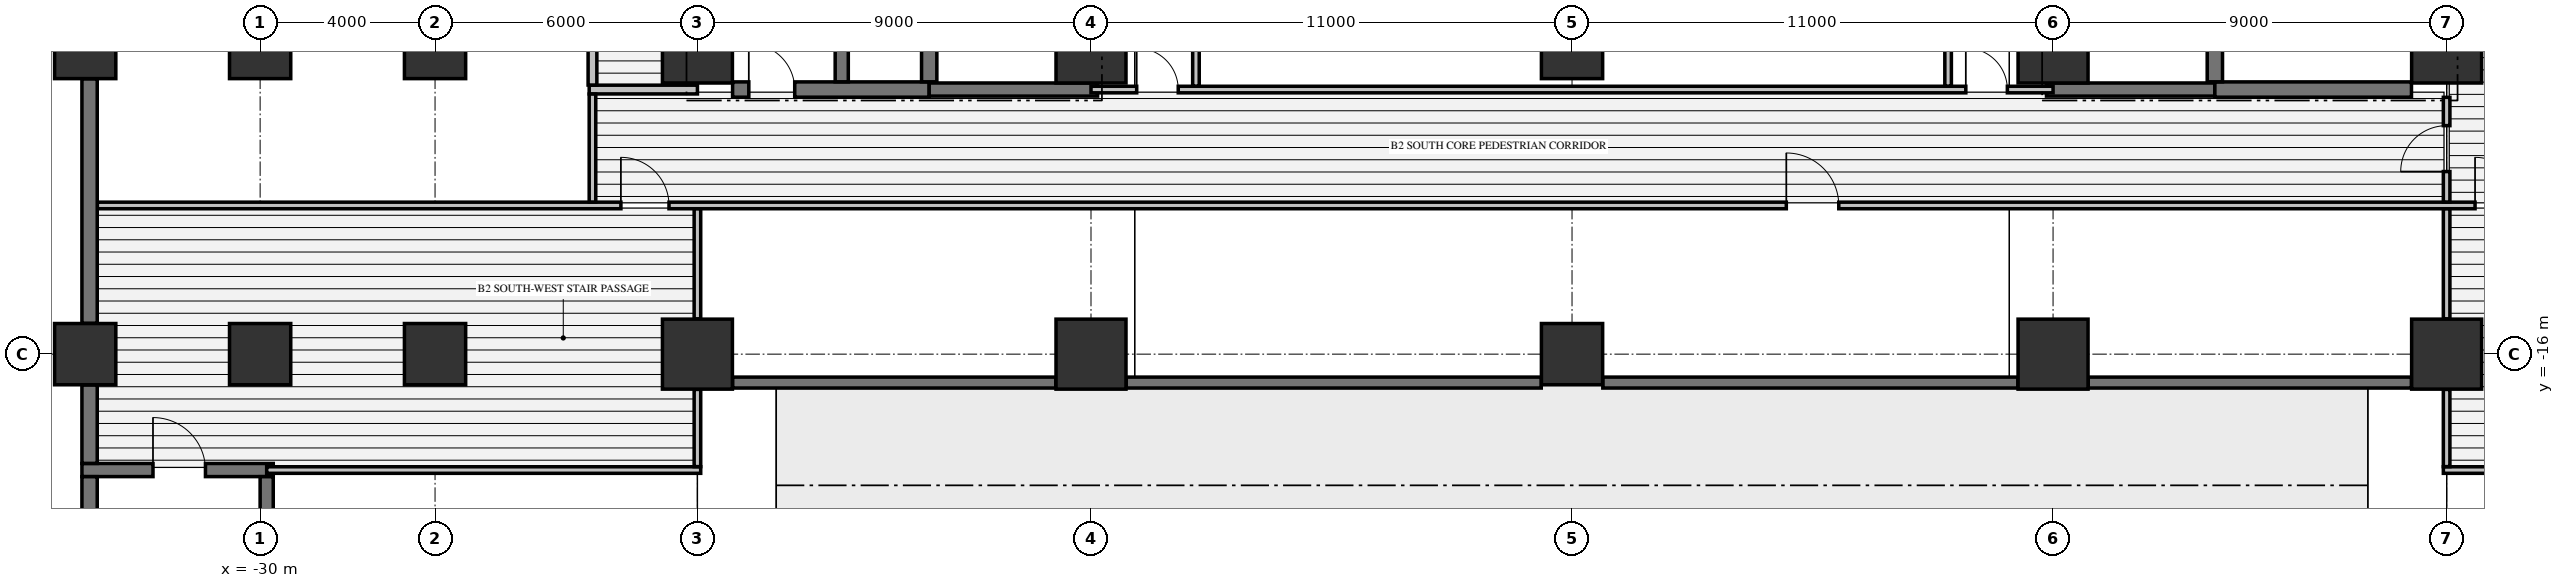
"""IFC4 building model, lengths in metres.
Left out: names, types, materials, properties, quantities, classifications, styles, units other than length and angle.
Written with IfcOpenShell. Run it as: python <this file> out.ifc"""

import sys

from ifc_helpers import new_model, si_unit, direction, frame, frame_2d, origin, origin_2d, place, context, subcontext, project, spatial, rectangle, extrude, element, fill, save


model = new_model("IFC4")
c1 = context("Model", 3, precision=1e-05, world=origin(), true_north=direction((0.0, 1.0)))
c2 = subcontext(c1, "Body", "Model", "MODEL_VIEW")
j1 = project(units=[si_unit("LENGTHUNIT", "METRE"), si_unit("PLANEANGLEUNIT", "RADIAN")], contexts=[c1])
p1 = place(None, origin())
s1 = spatial("IfcSite", under=j1, at=p1, CompositionType="ELEMENT")
p2 = place(p1, origin())
s2 = spatial("IfcBuilding", under=s1, at=p2, CompositionType="ELEMENT")
p3 = place(p2, frame((0.0, 0.0, -9.1)))
s3 = spatial("IfcBuildingStorey", under=s2, at=p3, CompositionType="ELEMENT", Elevation=-9.1)
for number, where, z_axis, x_axis in (
    (1, (-34.0, -16.0, -0.45), (0.0, 0.0, 1.0), (1.0, 0.0, 0.0)),
    (2, (-34.0, -9.0, -0.45), (0.0, 0.0, 1.0), (1.0, 0.0, 0.0)),
    (3, (-30.0, -16.0, -0.45), (0.0, 0.0, 1.0), (1.0, 0.0, 0.0)),
    (4, (-30.0, -9.0, -0.45), (0.0, 0.0, 1.0), (1.0, 0.0, 0.0)),
    (5, (-26.0, -16.0, -0.45), (0.0, 0.0, 1.0), (1.0, 0.0, 0.0)),
    (6, (-26.0, -9.0, -0.45), (0.0, 0.0, 1.0), (1.0, 0.0, 0.0)),
):
    element("IfcColumn", number, at=place(p3, frame(where, z_axis=z_axis, x_axis=x_axis)), inside=s3, PredefinedType="COLUMN", context=c2, shape_type="SweptSolid", body=[
        extrude(rectangle(XDim=1.4, YDim=1.4, at=origin_2d()), origin(), (0.0, 0.0, 1.0), 4.65),
    ])
for number, where, z_axis, x_axis in (
    (7, (-20.0, -16.0, -0.45), (0.0, 0.0, 1.0), (1.0, 0.0, 0.0)),
    (8, (-20.0, -9.0, -0.45), (0.0, 0.0, 1.0), (1.0, 0.0, 0.0)),
    (9, (-11.0, -16.0, -0.45), (0.0, 0.0, 1.0), (1.0, 0.0, 0.0)),
    (10, (-11.0, -9.0, -0.45), (0.0, 0.0, 1.0), (1.0, 0.0, 0.0)),
):
    element("IfcColumn", number, at=place(p3, frame(where, z_axis=z_axis, x_axis=x_axis)), inside=s3, PredefinedType="COLUMN", context=c2, shape_type="SweptSolid", body=[
        extrude(rectangle(XDim=1.6, YDim=1.6, at=origin_2d()), origin(), (0.0, 0.0, 1.0), 4.65),
    ])
for number, where, z_axis, x_axis in (
    (11, (0.0, -16.0, -0.45), (0.0, 0.0, 1.0), (1.0, 0.0, 0.0)),
    (12, (0.0, -9.0, -0.45), (0.0, 0.0, 1.0), (1.0, 0.0, 0.0)),
):
    element("IfcColumn", number, at=place(p3, frame(where, z_axis=z_axis, x_axis=x_axis)), inside=s3, PredefinedType="COLUMN", context=c2, shape_type="SweptSolid", body=[
        extrude(rectangle(XDim=1.4, YDim=1.4, at=origin_2d()), origin(), (0.0, 0.0, 1.0), 4.65),
    ])
for number, where, z_axis, x_axis in (
    (13, (11.0, -16.0, -0.45), (0.0, 0.0, 1.0), (1.0, 0.0, 0.0)),
    (14, (11.0, -9.0, -0.45), (0.0, 0.0, 1.0), (1.0, 0.0, 0.0)),
    (15, (20.0, -16.0, -0.45), (0.0, 0.0, 1.0), (1.0, 0.0, 0.0)),
    (16, (20.0, -9.0, -0.45), (0.0, 0.0, 1.0), (1.0, 0.0, 0.0)),
):
    element("IfcColumn", number, at=place(p3, frame(where, z_axis=z_axis, x_axis=x_axis)), inside=s3, PredefinedType="COLUMN", context=c2, shape_type="SweptSolid", body=[
        extrude(rectangle(XDim=1.6, YDim=1.6, at=origin_2d()), origin(), (0.0, 0.0, 1.0), 4.65),
    ])
p4 = place(p3, frame((-34.075, -18.65, 0.0), z_axis=(0.0, 0.0, 1.0), x_axis=(1.0, 0.0, 0.0)))
e17 = element("IfcWall", 17, at=p4, inside=s3, PredefinedType="SHEAR", context=c2, shape_type="SweptSolid", body=[
    extrude(rectangle(XDim=4.375, YDim=0.3, at=frame_2d((2.188, 0.0))), origin(), (0.0, 0.0, 1.0), 4.2),
])
p5 = place(p4, frame((1.625, 0.0, 0.0)))
e18 = element("IfcOpeningElement", 18, at=p5, cuts=e17, PredefinedType="OPENING", context=c2, shape_type="SweptSolid", body=[
    extrude(rectangle(XDim=1.2, YDim=2.15, at=frame_2d((0.6, 1.075))), frame((0.0, 0.16, 0.0), z_axis=(0.0, -1.0, 0.0), x_axis=(1.0, 0.0, 0.0)), (0.0, 0.0, 1.0), 0.32),
])
p6 = place(p3, frame((-19.196, -16.65, 0.0), z_axis=(0.0, 0.0, 1.0), x_axis=(1.0, 0.0, 0.0)))
e19 = element("IfcWall", 19, at=p6, inside=s3, PredefinedType="SOLIDWALL", context=c2, shape_type="SweptSolid", body=[
    extrude(rectangle(XDim=7.392, YDim=0.25, at=frame_2d((3.696, 0.0))), origin(), (0.0, 0.0, 1.0), 4.2),
])
for number, where, z_axis, x_axis in (
    (20, (-10.196, -16.65, 0.0), (0.0, 0.0, 1.0), (1.0, 0.0, 0.0)),
    (21, (0.704, -16.65, 0.0), (0.0, 0.0, 1.0), (1.0, 0.0, 0.0)),
):
    element("IfcWall", number, at=place(p3, frame(where, z_axis=z_axis, x_axis=x_axis)), inside=s3, PredefinedType="SOLIDWALL", context=c2, shape_type="SweptSolid", body=[
        extrude(rectangle(XDim=9.492, YDim=0.25, at=frame_2d((4.746, 0.0))), origin(), (0.0, 0.0, 1.0), 4.2),
    ])
p7 = place(p3, frame((11.804, -16.65, 0.0), z_axis=(0.0, 0.0, 1.0), x_axis=(1.0, 0.0, 0.0)))
e22 = element("IfcWall", 22, at=p7, inside=s3, PredefinedType="SOLIDWALL", context=c2, shape_type="SweptSolid", body=[
    extrude(rectangle(XDim=7.392, YDim=0.25, at=frame_2d((3.696, 0.0))), origin(), (0.0, 0.0, 1.0), 4.2),
])
p8 = place(p3, frame((-19.196, -9.95, 0.0), z_axis=(0.0, 0.0, 1.0), x_axis=(1.0, 0.0, 0.0)))
e23 = element("IfcWall", 23, at=p8, inside=s3, PredefinedType="SHEAR", context=c2, shape_type="SweptSolid", body=[
    extrude(rectangle(XDim=4.496, YDim=0.35, at=frame_2d((2.248, 0.0))), origin(), (0.0, 0.0, 1.0), 4.2),
])
p9 = place(p8, frame((0.371, 0.0, 0.0)))
e24 = element("IfcOpeningElement", 24, at=p9, cuts=e23, PredefinedType="OPENING", context=c2, shape_type="SweptSolid", body=[
    extrude(rectangle(XDim=1.05, YDim=2.15, at=frame_2d((0.525, 1.075))), frame((0.0, 0.185, 0.0), z_axis=(0.0, -1.0, 0.0), x_axis=(1.0, 0.0, 0.0)), (0.0, 0.0, 1.0), 0.37),
])
for number, where, z_axis, x_axis in (
    (25, (-14.7, -9.95, 0.0), (0.0, 0.0, 1.0), (1.0, 0.0, 0.0)),
    (26, (10.85, -9.95, 0.0), (0.0, 0.0, 1.0), (1.0, 0.0, 0.0)),
):
    element("IfcWall", number, at=place(p3, frame(where, z_axis=z_axis, x_axis=x_axis)), inside=s3, PredefinedType="SHEAR", context=c2, shape_type="SweptSolid", body=[
        extrude(rectangle(XDim=3.85, YDim=0.3, at=frame_2d((1.925, 0.0))), origin(), (0.0, 0.0, 1.0), 4.2),
    ])
p10 = place(p3, frame((14.7, -9.95, 0.0), z_axis=(0.0, 0.0, 1.0), x_axis=(1.0, 0.0, 0.0)))
e27 = element("IfcWall", 27, at=p10, inside=s3, PredefinedType="SHEAR", context=c2, shape_type="SweptSolid", body=[
    extrude(rectangle(XDim=4.496, YDim=0.35, at=frame_2d((2.248, 0.0))), origin(), (0.0, 0.0, 1.0), 4.2),
])
for number, where, z_axis, x_axis in (
    (28, (-29.85, -18.65, 0.0), (0.0, 0.0, 1.0), (1.0, 0.0, 0.0)),
    (29, (19.925, -18.65, 0.0), (0.0, 0.0, 1.0), (1.0, 0.0, 0.0)),
):
    element("IfcWall", number, at=place(p3, frame(where, z_axis=z_axis, x_axis=x_axis)), inside=s3, PredefinedType="PARTITIONING", context=c2, shape_type="SweptSolid", body=[
        extrude(rectangle(XDim=9.925, YDim=0.15, at=frame_2d((4.962, 0.0))), origin(), (0.0, 0.0, 1.0), 4.2),
    ])
p11 = place(p3, frame((-33.722, -12.6, 0.0), z_axis=(0.0, 0.0, 1.0), x_axis=(1.0, 0.0, 0.0)))
e30 = element("IfcWall", 30, at=p11, inside=s3, PredefinedType="PARTITIONING", context=c2, shape_type="SweptSolid", body=[
    extrude(rectangle(XDim=56.222, YDim=0.15, at=frame_2d((28.111, 0.0))), origin(), (0.0, 0.0, 1.0), 3.74),
])
p12 = place(p11, frame((11.972, 0.0, 0.0)))
e31 = element("IfcOpeningElement", 31, at=p12, cuts=e30, PredefinedType="OPENING", context=c2, shape_type="SweptSolid", body=[
    extrude(rectangle(XDim=1.1, YDim=2.15, at=frame_2d((0.55, 1.075))), frame((0.0, 0.085, 0.0), z_axis=(0.0, -1.0, 0.0), x_axis=(1.0, 0.0, 0.0)), (0.0, 0.0, 1.0), 0.17),
])
p13 = place(p11, frame((54.372, 0.0, 0.0)))
e32 = element("IfcOpeningElement", 32, at=p13, cuts=e30, PredefinedType="OPENING", context=c2, shape_type="SweptSolid", body=[
    extrude(rectangle(XDim=1.1, YDim=2.15, at=frame_2d((0.55, 1.075))), frame((0.0, 0.085, 0.0), z_axis=(0.0, -1.0, 0.0), x_axis=(1.0, 0.0, 0.0)), (0.0, 0.0, 1.0), 0.17),
])
p14 = place(p11, frame((38.622, 0.0, 0.0)))
e33 = element("IfcOpeningElement", 33, at=p14, cuts=e30, PredefinedType="OPENING", context=c2, shape_type="SweptSolid", body=[
    extrude(rectangle(XDim=1.2, YDim=2.15, at=frame_2d((0.6, 1.075))), frame((0.0, 0.085, 0.0), z_axis=(0.0, -1.0, 0.0), x_axis=(1.0, 0.0, 0.0)), (0.0, 0.0, 1.0), 0.17),
])
p15 = place(p3, frame((-22.475, -9.95, 0.0), z_axis=(0.0, 0.0, 1.0), x_axis=(1.0, 0.0, 0.0)))
e34 = element("IfcWall", 34, at=p15, inside=s3, PredefinedType="PARTITIONING", context=c2, shape_type="SweptSolid", body=[
    extrude(rectangle(XDim=2.475, YDim=0.2, at=frame_2d((1.238, 0.0))), origin(), (0.0, 0.0, 1.0), 4.2),
])
p16 = place(p3, frame((-11.0, -9.95, 0.0), z_axis=(0.0, 0.0, 1.0), x_axis=(1.0, 0.0, 0.0)))
e35 = element("IfcWall", 35, at=p16, inside=s3, PredefinedType="PARTITIONING", context=c2, shape_type="SweptSolid", body=[
    extrude(rectangle(XDim=22.0, YDim=0.15, at=frame_2d((11.0, 0.0))), origin(), (0.0, 0.0, 1.0), 4.2),
])
p17 = place(p16, frame((1.045, 0.0, 0.0)))
e36 = element("IfcOpeningElement", 36, at=p17, cuts=e35, PredefinedType="OPENING", context=c2, shape_type="SweptSolid", body=[
    extrude(rectangle(XDim=0.95, YDim=2.15, at=frame_2d((0.475, 1.075))), frame((0.0, 0.085, 0.0), z_axis=(0.0, -1.0, 0.0), x_axis=(1.0, 0.0, 0.0)), (0.0, 0.0, 1.0), 0.17),
])
p18 = place(p16, frame((20.005, 0.0, 0.0)))
e37 = element("IfcOpeningElement", 37, at=p18, cuts=e35, PredefinedType="OPENING", context=c2, shape_type="SweptSolid", body=[
    extrude(rectangle(XDim=0.95, YDim=2.15, at=frame_2d((0.475, 1.075))), frame((0.0, 0.085, 0.0), z_axis=(0.0, -1.0, 0.0), x_axis=(1.0, 0.0, 0.0)), (0.0, 0.0, 1.0), 0.17),
])
p19 = place(p3, frame((-33.9, -21.296, 0.0), z_axis=(0.0, 0.0, 1.0), x_axis=(0.0, 1.0, 0.0)))
e38 = element("IfcWall", 38, at=p19, inside=s3, PredefinedType="SHEAR", context=c2, shape_type="SweptSolid", body=[
    extrude(rectangle(XDim=2.494, YDim=0.35, at=frame_2d((1.247, 0.0))), origin(), (0.0, 0.0, 1.0), 4.2),
])
p20 = place(p3, frame((-33.9, -18.498, 0.0), z_axis=(0.0, 0.0, 1.0), x_axis=(0.0, 1.0, 0.0)))
e39 = element("IfcWall", 39, at=p20, inside=s3, PredefinedType="SHEAR", context=c2, shape_type="SweptSolid", body=[
    extrude(rectangle(XDim=1.794, YDim=0.35, at=frame_2d((0.897, 0.0))), origin(), (0.0, 0.0, 1.0), 4.2),
])
p21 = place(p3, frame((-33.9, -15.296, 0.0), z_axis=(0.0, 0.0, 1.0), x_axis=(0.0, 1.0, 0.0)))
e40 = element("IfcWall", 40, at=p21, inside=s3, PredefinedType="SHEAR", context=c2, shape_type="SweptSolid", body=[
    extrude(rectangle(XDim=5.592, YDim=0.35, at=frame_2d((2.796, 0.0))), origin(), (0.0, 0.0, 1.0), 4.2),
])
p22 = place(p3, frame((-29.85, -28.296, 0.0), z_axis=(0.0, 0.0, 1.0), x_axis=(0.0, 1.0, 0.0)))
e41 = element("IfcWall", 41, at=p22, inside=s3, PredefinedType="SHEAR", context=c2, shape_type="SweptSolid", body=[
    extrude(rectangle(XDim=9.494, YDim=0.3, at=frame_2d((4.747, 0.0))), origin(), (0.0, 0.0, 1.0), 4.2),
])
p23 = place(p3, frame((-16.7, -9.773, 0.0), z_axis=(0.0, 0.0, 1.0), x_axis=(0.0, 1.0, 0.0)))
e42 = element("IfcWall", 42, at=p23, inside=s3, PredefinedType="SHEAR", context=c2, shape_type="SweptSolid", body=[
    extrude(rectangle(XDim=9.371, YDim=0.3, at=frame_2d((4.686, 0.0))), origin(), (0.0, 0.0, 1.0), 4.2),
])
for number, where, z_axis, x_axis in (
    (43, (-14.7, -9.773, 0.0), (0.0, 0.0, 1.0), (0.0, 1.0, 0.0)),
    (44, (14.7, -9.773, 0.0), (0.0, 0.0, 1.0), (0.0, 1.0, 0.0)),
):
    element("IfcWall", number, at=place(p3, frame(where, z_axis=z_axis, x_axis=x_axis)), inside=s3, PredefinedType="SHEAR", context=c2, shape_type="SweptSolid", body=[
        extrude(rectangle(XDim=9.371, YDim=0.35, at=frame_2d((4.686, 0.0))), origin(), (0.0, 0.0, 1.0), 4.2),
    ])
p24 = place(p3, frame((-22.4, -12.522, 0.0), z_axis=(0.0, 0.0, 1.0), x_axis=(0.0, 1.0, 0.0)))
e45 = element("IfcWall", 45, at=p24, inside=s3, PredefinedType="PARTITIONING", context=c2, shape_type="SweptSolid", body=[
    extrude(rectangle(XDim=2.469, YDim=0.15, at=frame_2d((1.234, 0.0))), origin(), (0.0, 0.0, 1.0), 4.2),
])
p25 = place(p3, frame((-22.4, -9.847, 0.0), z_axis=(0.0, 0.0, 1.0), x_axis=(0.0, 1.0, 0.0)))
e46 = element("IfcWall", 46, at=p25, inside=s3, PredefinedType="PARTITIONING", context=c2, shape_type="SweptSolid", body=[
    extrude(rectangle(XDim=0.894, YDim=0.2, at=frame_2d((0.447, 0.0))), origin(), (0.0, 0.0, 1.0), 4.2),
])
p26 = place(p3, frame((-20.0, -18.572, 0.0), z_axis=(0.0, 0.0, 1.0), x_axis=(0.0, 1.0, 0.0)))
e47 = element("IfcWall", 47, at=p26, inside=s3, PredefinedType="PARTITIONING", context=c2, shape_type="SweptSolid", body=[
    extrude(rectangle(XDim=1.766, YDim=0.15, at=frame_2d((0.883, 0.0))), origin(), (0.0, 0.0, 1.0), 3.242),
])
p27 = place(p3, frame((-20.0, -15.194, 0.0), z_axis=(0.0, 0.0, 1.0), x_axis=(0.0, 1.0, 0.0)))
e48 = element("IfcWall", 48, at=p27, inside=s3, PredefinedType="PARTITIONING", context=c2, shape_type="SweptSolid", body=[
    extrude(rectangle(XDim=2.516, YDim=0.15, at=frame_2d((1.258, 0.0))), origin(), (0.0, 0.0, 1.0), 4.2),
])
for number, where, z_axis, x_axis in (
    (49, (-8.6, -9.872, 0.0), (0.0, 0.0, 1.0), (0.0, 1.0, 0.0)),
    (50, (8.6, -9.872, 0.0), (0.0, 0.0, 1.0), (0.0, 1.0, 0.0)),
):
    element("IfcWall", number, at=place(p3, frame(where, z_axis=z_axis, x_axis=x_axis)), inside=s3, PredefinedType="PARTITIONING", context=c2, shape_type="SweptSolid", body=[
        extrude(rectangle(XDim=9.266, YDim=0.15, at=frame_2d((4.633, 0.0))), origin(), (0.0, 0.0, 1.0), 4.2),
    ])
p28 = place(p3, frame((20.0, -18.572, 0.0), z_axis=(0.0, 0.0, 1.0), x_axis=(0.0, 1.0, 0.0)))
e51 = element("IfcWall", 51, at=p28, inside=s3, PredefinedType="PARTITIONING", context=c2, shape_type="SweptSolid", body=[
    extrude(rectangle(XDim=1.766, YDim=0.15, at=frame_2d((0.883, 0.0))), origin(), (0.0, 0.0, 1.0), 3.242),
])
p29 = place(p3, frame((20.0, -15.194, 0.0), z_axis=(0.0, 0.0, 1.0), x_axis=(0.0, 1.0, 0.0)))
e52 = element("IfcWall", 52, at=p29, inside=s3, PredefinedType="PARTITIONING", context=c2, shape_type="SweptSolid", body=[
    extrude(rectangle(XDim=2.516, YDim=0.15, at=frame_2d((1.258, 0.0))), origin(), (0.0, 0.0, 1.0), 3.242),
])
p30 = place(p3, frame((20.0, -12.522, 0.0), z_axis=(0.0, 0.0, 1.0), x_axis=(0.0, 1.0, 0.0)))
e53 = element("IfcWall", 53, at=p30, inside=s3, PredefinedType="PARTITIONING", context=c2, shape_type="SweptSolid", body=[
    extrude(rectangle(XDim=2.394, YDim=0.15, at=frame_2d((1.197, 0.0))), origin(), (0.0, 0.0, 1.0), 3.242),
])
p31 = place(p30, frame((0.697, 0.0, 0.0)))
e54 = element("IfcOpeningElement", 54, at=p31, cuts=e53, PredefinedType="OPENING", context=c2, shape_type="SweptSolid", body=[
    extrude(rectangle(XDim=1.05, YDim=2.15, at=frame_2d((0.525, 1.075))), frame((0.0, 0.085, 0.0), z_axis=(0.0, -1.0, 0.0), x_axis=(1.0, 0.0, 0.0)), (0.0, 0.0, 1.0), 0.17),
])
p32 = place(p9, origin())
e55 = element("IfcDoor", 55, at=p32, inside=s3, OperationType="SINGLE_SWING_LEFT", PredefinedType="DOOR", context=c2, shape_type="SweptSolid", body=[
    extrude(rectangle(XDim=1.05, YDim=2.15, at=frame_2d((0.525, 1.075))), frame((0.0, 0.025, 0.0), z_axis=(0.0, -1.0, 0.0), x_axis=(1.0, 0.0, 0.0)), (0.0, 0.0, 1.0), 0.05),
])
fill(e24, e55)
p33 = place(p5, origin())
e56 = element("IfcDoor", 56, at=p33, inside=s3, OperationType="SINGLE_SWING_LEFT", PredefinedType="DOOR", context=c2, shape_type="SweptSolid", body=[
    extrude(rectangle(XDim=1.2, YDim=2.15, at=frame_2d((0.6, 1.075))), frame((0.0, 0.025, 0.0), z_axis=(0.0, -1.0, 0.0), x_axis=(1.0, 0.0, 0.0)), (0.0, 0.0, 1.0), 0.05),
])
fill(e18, e56)
p34 = place(p17, origin())
e57 = element("IfcDoor", 57, at=p34, inside=s3, OperationType="SINGLE_SWING_LEFT", PredefinedType="DOOR", context=c2, shape_type="SweptSolid", body=[
    extrude(rectangle(XDim=0.95, YDim=2.15, at=frame_2d((0.475, 1.075))), frame((0.0, 0.025, 0.0), z_axis=(0.0, -1.0, 0.0), x_axis=(1.0, 0.0, 0.0)), (0.0, 0.0, 1.0), 0.05),
])
fill(e36, e57)
p35 = place(p18, origin())
e58 = element("IfcDoor", 58, at=p35, inside=s3, OperationType="SINGLE_SWING_LEFT", PredefinedType="DOOR", context=c2, shape_type="SweptSolid", body=[
    extrude(rectangle(XDim=0.95, YDim=2.15, at=frame_2d((0.475, 1.075))), frame((0.0, 0.025, 0.0), z_axis=(0.0, -1.0, 0.0), x_axis=(1.0, 0.0, 0.0)), (0.0, 0.0, 1.0), 0.05),
])
fill(e37, e58)
p36 = place(p12, origin())
e59 = element("IfcDoor", 59, at=p36, inside=s3, OperationType="SINGLE_SWING_LEFT", PredefinedType="DOOR", context=c2, shape_type="SweptSolid", body=[
    extrude(rectangle(XDim=1.1, YDim=2.15, at=frame_2d((0.55, 1.075))), frame((0.0, 0.025, 0.0), z_axis=(0.0, -1.0, 0.0), x_axis=(1.0, 0.0, 0.0)), (0.0, 0.0, 1.0), 0.05),
])
fill(e31, e59)
p37 = place(p31, origin())
e60 = element("IfcDoor", 60, at=p37, inside=s3, OperationType="SINGLE_SWING_LEFT", PredefinedType="DOOR", context=c2, shape_type="SweptSolid", body=[
    extrude(rectangle(XDim=1.05, YDim=2.15, at=frame_2d((0.525, 1.075))), frame((0.0, 0.025, 0.0), z_axis=(0.0, -1.0, 0.0), x_axis=(1.0, 0.0, 0.0)), (0.0, 0.0, 1.0), 0.05),
])
fill(e54, e60)
p38 = place(p13, origin())
e61 = element("IfcDoor", 61, at=p38, inside=s3, OperationType="SINGLE_SWING_LEFT", PredefinedType="DOOR", context=c2, shape_type="SweptSolid", body=[
    extrude(rectangle(XDim=1.1, YDim=2.15, at=frame_2d((0.55, 1.075))), frame((0.0, 0.025, 0.0), z_axis=(0.0, -1.0, 0.0), x_axis=(1.0, 0.0, 0.0)), (0.0, 0.0, 1.0), 0.05),
])
fill(e32, e61)
p39 = place(p14, origin())
e62 = element("IfcDoor", 62, at=p39, inside=s3, OperationType="SINGLE_SWING_LEFT", PredefinedType="DOOR", context=c2, shape_type="SweptSolid", body=[
    extrude(rectangle(XDim=1.2, YDim=2.15, at=frame_2d((0.6, 1.075))), frame((0.0, 0.025, 0.0), z_axis=(0.0, -1.0, 0.0), x_axis=(1.0, 0.0, 0.0)), (0.0, 0.0, 1.0), 0.05),
])
fill(e33, e62)
save(model, sys.argv[1])
